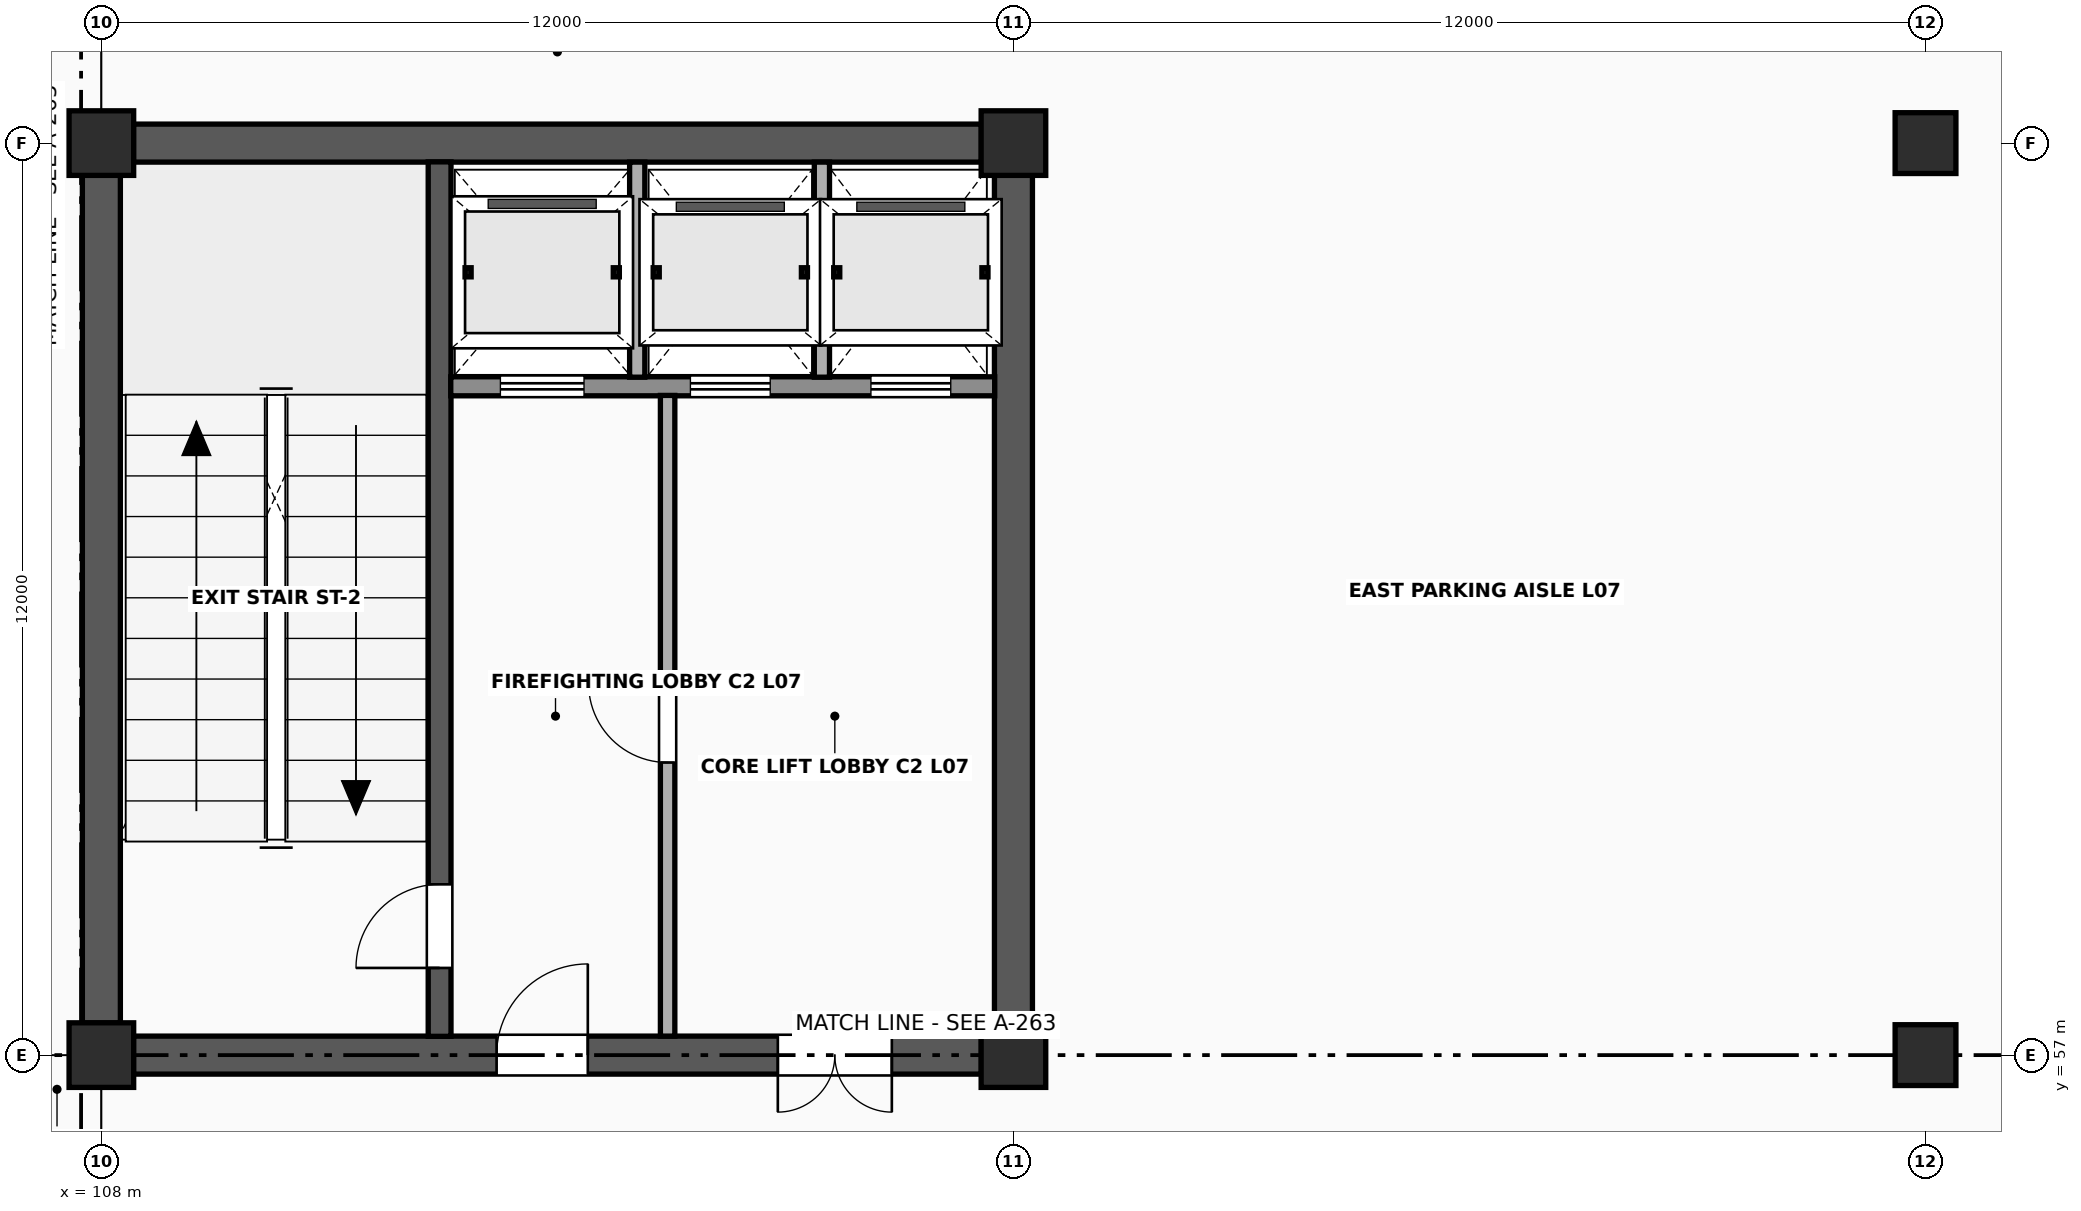
"""IFC4 building model, lengths in metres.
Left out: names, types, materials, properties, quantities, classifications, styles, units other than length and angle.
Written with IfcOpenShell. Run it as: python <this file> out.ifc"""

import sys

from ifc_helpers import new_model, si_unit, direction, frame, frame_2d, origin, origin_2d, place, context, subcontext, project, spatial, rectangle, extrude, element, fill, save


model = new_model("IFC4")
c1 = context("Model", 3, precision=1e-05, world=origin(), true_north=direction((0.0, 1.0)))
c2 = subcontext(c1, "Body", "Model", "MODEL_VIEW")
j1 = project(units=[si_unit("LENGTHUNIT", "METRE"), si_unit("PLANEANGLEUNIT", "RADIAN")], contexts=[c1])
p1 = place(None, origin())
s1 = spatial("IfcSite", under=j1, at=p1, CompositionType="ELEMENT")
p2 = place(p1, origin())
s2 = spatial("IfcBuilding", under=s1, at=p2, CompositionType="ELEMENT")
p3 = place(p2, frame((0.0, 0.0, 28.6)))
s3 = spatial("IfcBuildingStorey", under=s2, at=p3, CompositionType="ELEMENT", Elevation=28.6)
for number, where, z_axis, x_axis in (
    (1, (108.0, 57.0, 0.0), (0.0, 0.0, 1.0), (1.0, 0.0, 0.0)),
    (2, (108.0, 69.0, 0.0), (0.0, 0.0, 1.0), (1.0, 0.0, 0.0)),
    (3, (120.0, 57.0, 0.0), (0.0, 0.0, 1.0), (1.0, 0.0, 0.0)),
    (4, (120.0, 69.0, 0.0), (0.0, 0.0, 1.0), (1.0, 0.0, 0.0)),
):
    element("IfcColumn", number, at=place(p3, frame(where, z_axis=z_axis, x_axis=x_axis)), inside=s3, PredefinedType="COLUMN", context=c2, shape_type="SweptSolid", body=[
        extrude(rectangle(XDim=0.85, YDim=0.85, at=origin_2d()), origin(), (0.0, 0.0, 1.0), 3.8),
    ])
for number, where, z_axis, x_axis in (
    (5, (132.0, 57.0, 0.0), (0.0, 0.0, 1.0), (1.0, 0.0, 0.0)),
    (6, (132.0, 69.0, 0.0), (0.0, 0.0, 1.0), (1.0, 0.0, 0.0)),
):
    element("IfcColumn", number, at=place(p3, frame(where, z_axis=z_axis, x_axis=x_axis)), inside=s3, PredefinedType="COLUMN", context=c2, shape_type="SweptSolid", body=[
        extrude(rectangle(XDim=0.8, YDim=0.8, at=origin_2d()), origin(), (0.0, 0.0, 1.0), 3.8),
    ])
p4 = place(p3, frame((108.422, 57.0, 0.0), z_axis=(0.0, 0.0, 1.0), x_axis=(1.0, 0.0, 0.0)))
e7 = element("IfcWall", 7, at=p4, inside=s3, PredefinedType="SHEAR", context=c2, shape_type="SweptSolid", body=[
    extrude(rectangle(XDim=11.156, YDim=0.5, at=frame_2d((5.578, 0.0))), origin(), (0.0, 0.0, 1.0), 3.553),
])
p5 = place(p4, frame((4.778, 0.0, 0.0)))
e8 = element("IfcOpeningElement", 8, at=p5, cuts=e7, PredefinedType="OPENING", context=c2, shape_type="SweptSolid", body=[
    extrude(rectangle(XDim=1.2, YDim=2.2, at=frame_2d((0.6, 1.1))), frame((0.0, 0.265, 0.0), z_axis=(0.0, -1.0, 0.0), x_axis=(1.0, 0.0, 0.0)), (0.0, 0.0, 1.0), 0.53),
])
p6 = place(p4, frame((8.478, 0.0, 0.0)))
e9 = element("IfcOpeningElement", 9, at=p6, cuts=e7, PredefinedType="OPENING", context=c2, shape_type="SweptSolid", body=[
    extrude(rectangle(XDim=1.5, YDim=2.25, at=frame_2d((0.75, 1.125))), frame((0.0, 0.265, 0.0), z_axis=(0.0, -1.0, 0.0), x_axis=(1.0, 0.0, 0.0)), (0.0, 0.0, 1.0), 0.53),
])
for number, where, z_axis, x_axis in (
    (10, (108.422, 69.0, 0.0), (0.0, 0.0, 1.0), (1.0, 0.0, 0.0)),
    (11, (108.0, 57.422, 0.0), (0.0, 0.0, 1.0), (0.0, 1.0, 0.0)),
    (12, (120.0, 57.422, 0.0), (0.0, 0.0, 1.0), (0.0, 1.0, 0.0)),
):
    element("IfcWall", number, at=place(p3, frame(where, z_axis=z_axis, x_axis=x_axis)), inside=s3, PredefinedType="SHEAR", context=c2, shape_type="SweptSolid", body=[
        extrude(rectangle(XDim=11.156, YDim=0.5, at=frame_2d((5.578, 0.0))), origin(), (0.0, 0.0, 1.0), 3.553),
    ])
p7 = place(p3, frame((112.45, 57.247, 0.0), z_axis=(0.0, 0.0, 1.0), x_axis=(0.0, 1.0, 0.0)))
e13 = element("IfcWall", 13, at=p7, inside=s3, PredefinedType="SHEAR", context=c2, shape_type="SweptSolid", body=[
    extrude(rectangle(XDim=11.506, YDim=0.3, at=frame_2d((5.753, 0.0))), origin(), (0.0, 0.0, 1.0), 3.553),
])
p8 = place(p7, frame((0.9, 0.0, 0.0)))
e14 = element("IfcOpeningElement", 14, at=p8, cuts=e13, PredefinedType="OPENING", context=c2, shape_type="SweptSolid", body=[
    extrude(rectangle(XDim=1.1, YDim=2.2, at=frame_2d((0.55, 1.1))), frame((0.0, 0.165, 0.0), z_axis=(0.0, -1.0, 0.0), x_axis=(1.0, 0.0, 0.0)), (0.0, 0.0, 1.0), 0.33),
])
p9 = place(p3, frame((112.597, 65.8, 0.0), z_axis=(0.0, 0.0, 1.0), x_axis=(1.0, 0.0, 0.0)))
e15 = element("IfcWall", 15, at=p9, inside=s3, PredefinedType="SOLIDWALL", context=c2, shape_type="SweptSolid", body=[
    extrude(rectangle(XDim=7.156, YDim=0.25, at=frame_2d((3.578, 0.0))), origin(), (0.0, 0.0, 1.0), 3.553),
])
p10 = place(p9, frame((0.653, 0.0, 0.0)))
e16 = element("IfcOpeningElement", 16, at=p10, cuts=e15, PredefinedType="OPENING", context=c2, shape_type="SweptSolid", body=[
    extrude(rectangle(XDim=1.1, YDim=2.24, at=frame_2d((0.55, 1.12))), frame((0.0, 0.14, 0.0), z_axis=(0.0, -1.0, 0.0), x_axis=(1.0, 0.0, 0.0)), (0.0, 0.0, 1.0), 0.28),
])
p11 = place(p9, frame((3.153, 0.0, 0.0)))
e17 = element("IfcOpeningElement", 17, at=p11, cuts=e15, PredefinedType="OPENING", context=c2, shape_type="SweptSolid", body=[
    extrude(rectangle(XDim=1.05, YDim=2.2, at=frame_2d((0.525, 1.1))), frame((0.0, 0.14, 0.0), z_axis=(0.0, -1.0, 0.0), x_axis=(1.0, 0.0, 0.0)), (0.0, 0.0, 1.0), 0.28),
])
p12 = place(p9, frame((5.528, 0.0, 0.0)))
e18 = element("IfcOpeningElement", 18, at=p12, cuts=e15, PredefinedType="OPENING", context=c2, shape_type="SweptSolid", body=[
    extrude(rectangle(XDim=1.05, YDim=2.2, at=frame_2d((0.525, 1.1))), frame((0.0, 0.14, 0.0), z_axis=(0.0, -1.0, 0.0), x_axis=(1.0, 0.0, 0.0)), (0.0, 0.0, 1.0), 0.28),
])
for number, where, z_axis, x_axis in (
    (19, (115.05, 65.92, 0.0), (0.0, 0.0, 1.0), (0.0, 1.0, 0.0)),
    (20, (117.48, 65.92, 0.0), (0.0, 0.0, 1.0), (0.0, 1.0, 0.0)),
):
    element("IfcWall", number, at=place(p3, frame(where, z_axis=z_axis, x_axis=x_axis)), inside=s3, PredefinedType="SOLIDWALL", context=c2, shape_type="SweptSolid", body=[
        extrude(rectangle(XDim=2.83, YDim=0.2, at=frame_2d((1.415, 0.0))), origin(), (0.0, 0.0, 1.0), 3.543),
    ])
p13 = place(p3, frame((115.45, 57.25, 0.0), z_axis=(0.0, 0.0, 1.0), x_axis=(0.0, 1.0, 0.0)))
e21 = element("IfcWall", 21, at=p13, inside=s3, PredefinedType="SOLIDWALL", context=c2, shape_type="SweptSolid", body=[
    extrude(rectangle(XDim=8.43, YDim=0.19, at=frame_2d((4.215, 0.0))), origin(), (0.0, 0.0, 1.0), 3.543),
])
p14 = place(p13, frame((3.6, 0.0, 0.0)))
e22 = element("IfcOpeningElement", 22, at=p14, cuts=e21, PredefinedType="OPENING", context=c2, shape_type="SweptSolid", body=[
    extrude(rectangle(XDim=1.04, YDim=2.18, at=frame_2d((0.52, 1.09))), frame((0.0, 0.11, 0.0), z_axis=(0.0, -1.0, 0.0), x_axis=(1.0, 0.0, 0.0)), (0.0, 0.0, 1.0), 0.22),
])
p15 = place(p8, origin())
e23 = element("IfcDoor", 23, at=p15, inside=s3, OperationType="SINGLE_SWING_LEFT", PredefinedType="DOOR", context=c2, shape_type="SweptSolid", body=[
    extrude(rectangle(XDim=1.1, YDim=2.2, at=frame_2d((0.55, 1.1))), frame((0.0, 0.025, 0.0), z_axis=(0.0, -1.0, 0.0), x_axis=(1.0, 0.0, 0.0)), (0.0, 0.0, 1.0), 0.05),
])
fill(e14, e23)
p16 = place(p14, origin())
e24 = element("IfcDoor", 24, at=p16, inside=s3, OperationType="SINGLE_SWING_RIGHT", PredefinedType="DOOR", context=c2, shape_type="SweptSolid", body=[
    extrude(rectangle(XDim=1.04, YDim=2.18, at=frame_2d((0.52, 1.09))), frame((0.0, 0.025, 0.0), z_axis=(0.0, -1.0, 0.0), x_axis=(1.0, 0.0, 0.0)), (0.0, 0.0, 1.0), 0.05),
])
fill(e22, e24)
p17 = place(p5, origin())
e25 = element("IfcDoor", 25, at=p17, inside=s3, OperationType="SINGLE_SWING_RIGHT", PredefinedType="DOOR", context=c2, shape_type="SweptSolid", body=[
    extrude(rectangle(XDim=1.2, YDim=2.2, at=frame_2d((0.6, 1.1))), frame((0.0, 0.025, 0.0), z_axis=(0.0, -1.0, 0.0), x_axis=(1.0, 0.0, 0.0)), (0.0, 0.0, 1.0), 0.05),
])
fill(e8, e25)
p18 = place(p6, origin())
e26 = element("IfcDoor", 26, at=p18, inside=s3, OperationType="DOUBLE_DOOR_SINGLE_SWING", PredefinedType="DOOR", context=c2, shape_type="SweptSolid", body=[
    extrude(rectangle(XDim=1.5, YDim=2.25, at=frame_2d((0.75, 1.125))), frame((0.0, 0.025, 0.0), z_axis=(0.0, -1.0, 0.0), x_axis=(1.0, 0.0, 0.0)), (0.0, 0.0, 1.0), 0.05),
])
fill(e9, e26)
p19 = place(p10, origin())
e27 = element("IfcDoor", 27, at=p19, inside=s3, OperationType="SLIDING_TO_LEFT", PredefinedType="USERDEFINED", context=c2, shape_type="SweptSolid", body=[
    extrude(rectangle(XDim=1.1, YDim=2.24, at=frame_2d((0.55, 1.12))), frame((0.0, 0.025, 0.0), z_axis=(0.0, -1.0, 0.0), x_axis=(1.0, 0.0, 0.0)), (0.0, 0.0, 1.0), 0.05),
])
fill(e16, e27)
p20 = place(p11, origin())
e28 = element("IfcDoor", 28, at=p20, inside=s3, OperationType="SLIDING_TO_LEFT", PredefinedType="USERDEFINED", context=c2, shape_type="SweptSolid", body=[
    extrude(rectangle(XDim=1.05, YDim=2.2, at=frame_2d((0.525, 1.1))), frame((0.0, 0.025, 0.0), z_axis=(0.0, -1.0, 0.0), x_axis=(1.0, 0.0, 0.0)), (0.0, 0.0, 1.0), 0.05),
])
fill(e17, e28)
p21 = place(p12, origin())
e29 = element("IfcDoor", 29, at=p21, inside=s3, OperationType="SLIDING_TO_LEFT", PredefinedType="USERDEFINED", context=c2, shape_type="SweptSolid", body=[
    extrude(rectangle(XDim=1.05, YDim=2.2, at=frame_2d((0.525, 1.1))), frame((0.0, 0.025, 0.0), z_axis=(0.0, -1.0, 0.0), x_axis=(1.0, 0.0, 0.0)), (0.0, 0.0, 1.0), 0.05),
])
fill(e18, e29)
save(model, sys.argv[1])
